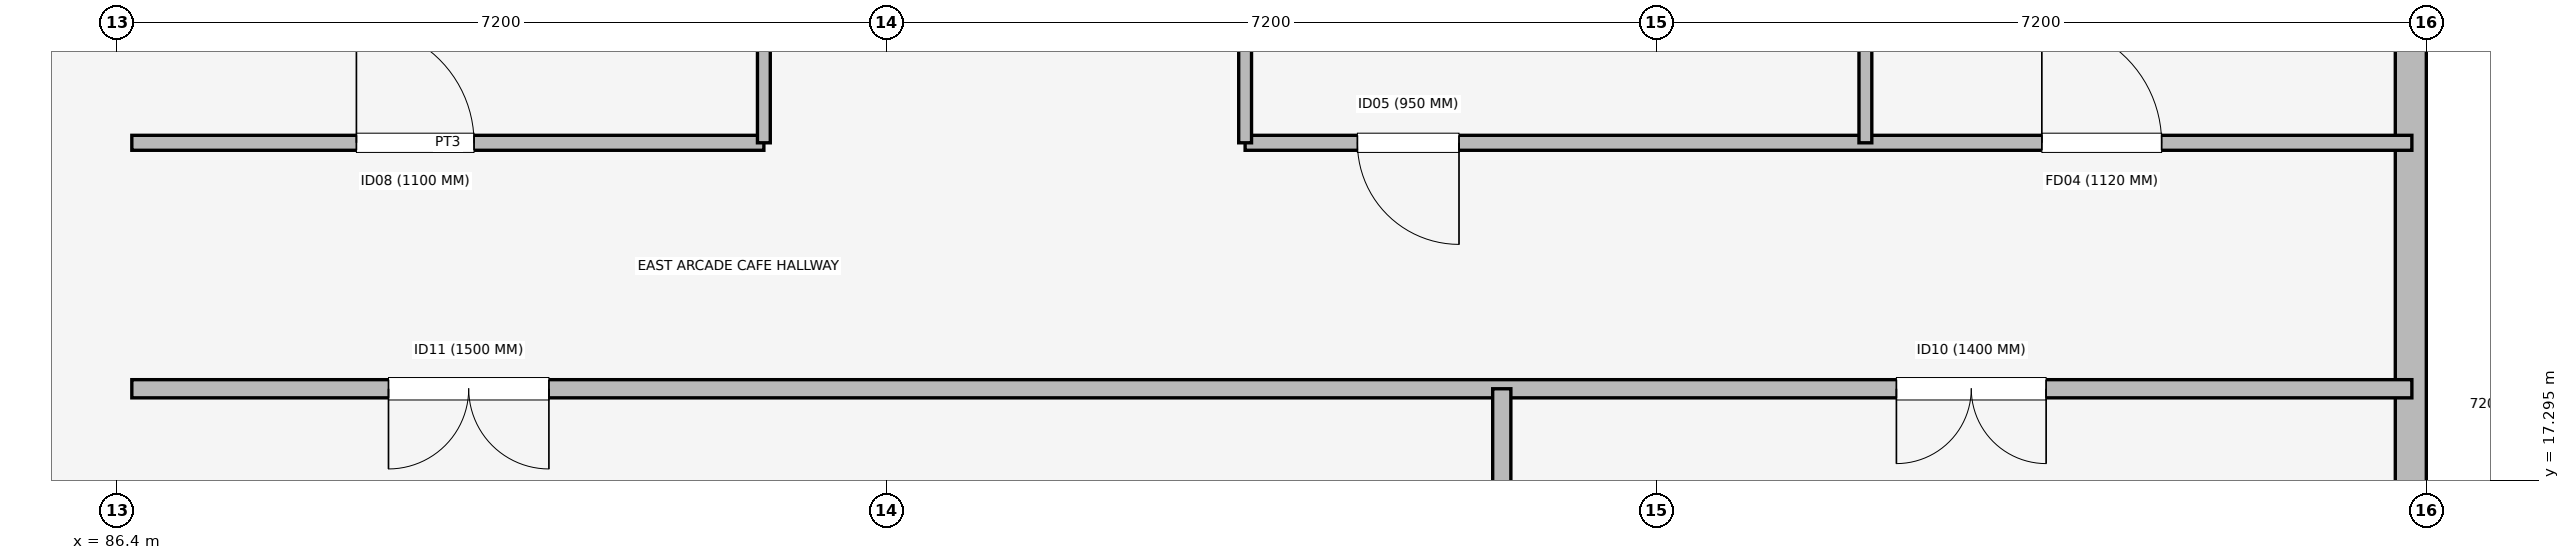
"""IFC4 building model, lengths in metres.
Left out: names, types, materials, properties, quantities, classifications, styles, units other than length and angle.
Written with IfcOpenShell. Run it as: python <this file> out.ifc"""

import sys

from ifc_helpers import new_model, si_unit, direction, frame, frame_2d, origin, place, context, subcontext, project, spatial, rectangle, extrude, element, fill, save


model = new_model("IFC4")
c1 = context("Model", 3, precision=1e-05, world=origin(), true_north=direction((0.0, 1.0)))
c2 = subcontext(c1, "Body", "Model", "MODEL_VIEW")
j1 = project(units=[si_unit("LENGTHUNIT", "METRE"), si_unit("PLANEANGLEUNIT", "RADIAN")], contexts=[c1])
p1 = place(None, origin())
s1 = spatial("IfcSite", under=j1, at=p1, CompositionType="ELEMENT")
p2 = place(p1, origin())
s2 = spatial("IfcBuilding", under=s1, at=p2, CompositionType="ELEMENT")
p3 = place(p2, origin())
s3 = spatial("IfcBuildingStorey", under=s2, at=p3, CompositionType="ELEMENT", Elevation=0.0)
p4 = place(p3, frame((107.85, 7.35, 0.0), z_axis=(0.0, 0.0, 1.0), x_axis=(0.0, 1.0, 0.0)))
e1 = element("IfcWall", 1, at=p4, inside=s3, PredefinedType="SOLIDWALL", context=c2, shape_type="SweptSolid", body=[
    extrude(rectangle(XDim=21.3, YDim=0.29, at=frame_2d((10.65, 0.0))), origin(), (0.0, 0.0, 1.0), 2.752),
])
p5 = place(p3, frame((86.54, 18.15, 0.0), z_axis=(0.0, 0.0, 1.0), x_axis=(1.0, 0.0, 0.0)))
e2 = element("IfcWall", 2, at=p5, inside=s3, PredefinedType="PARTITIONING", context=c2, shape_type="SweptSolid", body=[
    extrude(rectangle(XDim=21.32, YDim=0.17, at=frame_2d((10.66, 0.0))), origin(), (0.0, 0.0, 1.0), 3.5),
])
p6 = place(p5, frame((3.9, 0.0, 0.0), z_axis=(0.0, 0.0, 1.0), x_axis=(-1.0, 0.0, 0.0)))
e3 = element("IfcOpeningElement", 3, at=p6, cuts=e2, PredefinedType="OPENING", context=c2, shape_type="SweptSolid", body=[
    extrude(rectangle(XDim=1.5, YDim=2.28, at=frame_2d((0.75, 1.14))), frame((0.0, 0.095, 0.0), z_axis=(0.0, -1.0, 0.0), x_axis=(1.0, 0.0, 0.0)), (0.0, 0.0, 1.0), 0.19),
])
p7 = place(p5, frame((17.9, 0.0, 0.0), z_axis=(0.0, 0.0, 1.0), x_axis=(-1.0, 0.0, 0.0)))
e4 = element("IfcOpeningElement", 4, at=p7, cuts=e2, PredefinedType="OPENING", context=c2, shape_type="SweptSolid", body=[
    extrude(rectangle(XDim=1.4, YDim=2.22, at=frame_2d((0.7, 1.11))), frame((0.0, 0.095, 0.0), z_axis=(0.0, -1.0, 0.0), x_axis=(1.0, 0.0, 0.0)), (0.0, 0.0, 1.0), 0.19),
])
p8 = place(p3, frame((99.35, 7.5, 0.0), z_axis=(0.0, 0.0, 1.0), x_axis=(0.0, 1.0, 0.0)))
e5 = element("IfcWall", 5, at=p8, inside=s3, PredefinedType="PARTITIONING", context=c2, shape_type="SweptSolid", body=[
    extrude(rectangle(XDim=10.65, YDim=0.17, at=frame_2d((5.325, 0.0))), origin(), (0.0, 0.0, 1.0), 3.5),
])
p9 = place(p3, frame((86.54, 20.45, 0.0), z_axis=(0.0, 0.0, 1.0), x_axis=(1.0, 0.0, 0.0)))
e6 = element("IfcWall", 6, at=p9, inside=s3, PredefinedType="PARTITIONING", context=c2, shape_type="SweptSolid", body=[
    extrude(rectangle(XDim=5.91, YDim=0.14, at=frame_2d((2.955, 0.0))), origin(), (0.0, 0.0, 1.0), 3.5),
])
p10 = place(p9, frame((2.1, 0.0, 0.0)))
e7 = element("IfcOpeningElement", 7, at=p10, cuts=e6, PredefinedType="OPENING", context=c2, shape_type="SweptSolid", body=[
    extrude(rectangle(XDim=1.1, YDim=2.15, at=frame_2d((0.55, 1.075))), frame((0.0, 0.08, 0.0), z_axis=(0.0, -1.0, 0.0), x_axis=(1.0, 0.0, 0.0)), (0.0, 0.0, 1.0), 0.16),
])
p11 = place(p3, frame((96.95, 20.45, 0.0), z_axis=(0.0, 0.0, 1.0), x_axis=(1.0, 0.0, 0.0)))
e8 = element("IfcWall", 8, at=p11, inside=s3, PredefinedType="PARTITIONING", context=c2, shape_type="SweptSolid", body=[
    extrude(rectangle(XDim=10.91, YDim=0.14, at=frame_2d((5.455, 0.0))), origin(), (0.0, 0.0, 1.0), 3.5),
])
p12 = place(p11, frame((2.0, 0.0, 0.0), z_axis=(0.0, 0.0, 1.0), x_axis=(-1.0, 0.0, 0.0)))
e9 = element("IfcOpeningElement", 9, at=p12, cuts=e8, PredefinedType="OPENING", context=c2, shape_type="SweptSolid", body=[
    extrude(rectangle(XDim=0.95, YDim=2.12, at=frame_2d((0.475, 1.06))), frame((0.0, 0.08, 0.0), z_axis=(0.0, -1.0, 0.0), x_axis=(1.0, 0.0, 0.0)), (0.0, 0.0, 1.0), 0.16),
])
p13 = place(p11, frame((7.45, 0.0, 0.0)))
e10 = element("IfcOpeningElement", 10, at=p13, cuts=e8, PredefinedType="OPENING", context=c2, shape_type="SweptSolid", body=[
    extrude(rectangle(XDim=1.12, YDim=2.15, at=frame_2d((0.56, 1.075))), frame((0.0, 0.08, 0.0), z_axis=(0.0, -1.0, 0.0), x_axis=(1.0, 0.0, 0.0)), (0.0, 0.0, 1.0), 0.16),
])
for number, where, z_axis, x_axis in (
    (11, (92.45, 20.45, 0.0), (0.0, 0.0, 1.0), (0.0, 1.0, 0.0)),
    (12, (96.95, 20.45, 0.0), (0.0, 0.0, 1.0), (0.0, 1.0, 0.0)),
    (13, (102.75, 20.45, 0.0), (0.0, 0.0, 1.0), (0.0, 1.0, 0.0)),
):
    element("IfcWall", number, at=place(p3, frame(where, z_axis=z_axis, x_axis=x_axis)), inside=s3, PredefinedType="PARTITIONING", context=c2, shape_type="SweptSolid", body=[
        extrude(rectangle(XDim=8.05, YDim=0.12, at=frame_2d((4.025, 0.0))), origin(), (0.0, 0.0, 1.0), 3.5),
    ])
p14 = place(p6, origin())
e14 = element("IfcDoor", 14, at=p14, inside=s3, OperationType="DOUBLE_DOOR_SINGLE_SWING", PredefinedType="DOOR", context=c2, shape_type="SweptSolid", body=[
    extrude(rectangle(XDim=1.5, YDim=2.28, at=frame_2d((0.75, 1.14))), frame((0.0, 0.025, 0.0), z_axis=(0.0, -1.0, 0.0), x_axis=(1.0, 0.0, 0.0)), (0.0, 0.0, 1.0), 0.05),
])
fill(e3, e14)
p15 = place(p7, origin())
e15 = element("IfcDoor", 15, at=p15, inside=s3, OperationType="DOUBLE_DOOR_SINGLE_SWING", PredefinedType="DOOR", context=c2, shape_type="SweptSolid", body=[
    extrude(rectangle(XDim=1.4, YDim=2.22, at=frame_2d((0.7, 1.11))), frame((0.0, 0.025, 0.0), z_axis=(0.0, -1.0, 0.0), x_axis=(1.0, 0.0, 0.0)), (0.0, 0.0, 1.0), 0.05),
])
fill(e4, e15)
p16 = place(p10, origin())
e16 = element("IfcDoor", 16, at=p16, inside=s3, OperationType="SINGLE_SWING_LEFT", PredefinedType="DOOR", context=c2, shape_type="SweptSolid", body=[
    extrude(rectangle(XDim=1.1, YDim=2.15, at=frame_2d((0.55, 1.075))), frame((0.0, 0.025, 0.0), z_axis=(0.0, -1.0, 0.0), x_axis=(1.0, 0.0, 0.0)), (0.0, 0.0, 1.0), 0.05),
])
fill(e7, e16)
p17 = place(p12, origin())
e17 = element("IfcDoor", 17, at=p17, inside=s3, OperationType="SINGLE_SWING_RIGHT", PredefinedType="DOOR", context=c2, shape_type="SweptSolid", body=[
    extrude(rectangle(XDim=0.95, YDim=2.12, at=frame_2d((0.475, 1.06))), frame((0.0, 0.025, 0.0), z_axis=(0.0, -1.0, 0.0), x_axis=(1.0, 0.0, 0.0)), (0.0, 0.0, 1.0), 0.05),
])
fill(e9, e17)
p18 = place(p13, origin())
e18 = element("IfcDoor", 18, at=p18, inside=s3, OperationType="SINGLE_SWING_LEFT", PredefinedType="DOOR", context=c2, shape_type="SweptSolid", body=[
    extrude(rectangle(XDim=1.12, YDim=2.15, at=frame_2d((0.56, 1.075))), frame((0.0, 0.025, 0.0), z_axis=(0.0, -1.0, 0.0), x_axis=(1.0, 0.0, 0.0)), (0.0, 0.0, 1.0), 0.05),
])
fill(e10, e18)
save(model, sys.argv[1])
